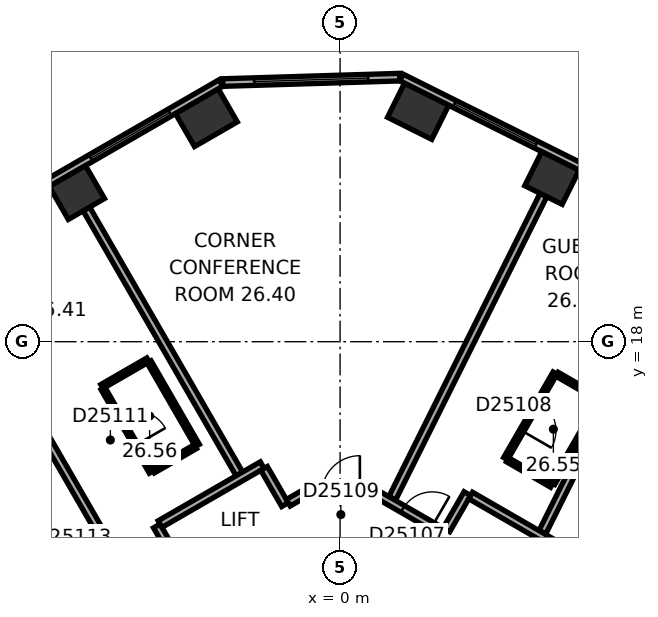
"""IFC4 building model, lengths in metres.
Left out: names, types, materials, properties, quantities, classifications, styles, units other than length and angle.
Written with IfcOpenShell. Run it as: python <this file> out.ifc"""

import sys

from ifc_helpers import new_model, si_unit, direction, frame, frame_2d, origin, origin_2d, place, context, subcontext, project, spatial, rectangle, extrude, element, fill, save


model = new_model("IFC4")
c1 = context("Model", 3, precision=1e-05, world=origin(), true_north=direction((0.0, 1.0)))
c2 = subcontext(c1, "Body", "Model", "MODEL_VIEW")
j1 = project(units=[si_unit("LENGTHUNIT", "METRE"), si_unit("PLANEANGLEUNIT", "RADIAN")], contexts=[c1])
p1 = place(None, origin())
s1 = spatial("IfcSite", under=j1, at=p1, CompositionType="ELEMENT")
p2 = place(p1, origin())
s2 = spatial("IfcBuilding", under=s1, at=p2, CompositionType="ELEMENT")
p3 = place(p2, frame((0.0, 0.0, 110.0)))
s3 = spatial("IfcBuildingStorey", under=s2, at=p3, CompositionType="ELEMENT", Elevation=110.0)
p4 = place(p3, frame((5.574, 22.306, 0.0), z_axis=(0.0, 0.0, 1.0), x_axis=(-0.894934361602, 0.44619781311, 0.0)))
e1 = element("IfcColumn", 1, at=p4, inside=s3, PredefinedType="COLUMN", context=c2, shape_type="SweptSolid", body=[
    extrude(rectangle(XDim=1.1, YDim=1.0, at=origin_2d()), origin(), (0.0, 0.0, 1.0), 3.3),
])
for number, where, z_axis, x_axis in (
    (2, (2.053, 24.062, 0.0), (0.0, 0.0, 1.0), (-0.895, 0.446, 0.0)),
    (3, (-3.518, 23.892, 0.0), (0.0, 0.0, 1.0), (-0.866, -0.5, 0.0)),
):
    element("IfcColumn", number, at=place(p3, frame(where, z_axis=z_axis, x_axis=x_axis)), inside=s3, PredefinedType="COLUMN", context=c2, shape_type="SweptSolid", body=[
        extrude(rectangle(XDim=1.3, YDim=1.0, at=origin_2d()), origin(), (0.0, 0.0, 1.0), 3.3),
    ])
p5 = place(p3, frame((-6.926, 21.925, 0.0), z_axis=(0.0, 0.0, 1.0), x_axis=(-0.866025403784, -0.5, 0.0)))
e4 = element("IfcColumn", 4, at=p5, inside=s3, PredefinedType="COLUMN", context=c2, shape_type="SweptSolid", body=[
    extrude(rectangle(XDim=1.1, YDim=1.0, at=origin_2d()), origin(), (0.0, 0.0, 1.0), 3.3),
])
p6 = place(p3, frame((20.63, 15.47, 0.0), z_axis=(0.0, 0.0, 1.0), x_axis=(-0.894934518609, 0.446197498203, 0.0)))
e5 = element("IfcWall", 5, at=p6, inside=s3, PredefinedType="STANDARD", context=c2, shape_type="SweptSolid", body=[
    extrude(rectangle(XDim=21.246, YDim=0.2, at=frame_2d((10.623, 0.0))), origin(), (0.0, 0.0, 1.0), 3.3),
])
p7 = place(p6, frame((1.553, 0.0, 0.8)))
e6 = element("IfcOpeningElement", 6, at=p7, cuts=e5, PredefinedType="OPENING", context=c2, shape_type="SweptSolid", body=[
    extrude(rectangle(XDim=2.4, YDim=1.7, at=frame_2d((1.2, 0.85))), frame((0.0, 0.11, 0.0), z_axis=(0.0, -1.0, 0.0), x_axis=(1.0, 0.0, 0.0)), (0.0, 0.0, 1.0), 0.22),
])
p8 = place(p6, frame((5.488, 0.0, 0.8)))
e7 = element("IfcOpeningElement", 7, at=p8, cuts=e5, PredefinedType="OPENING", context=c2, shape_type="SweptSolid", body=[
    extrude(rectangle(XDim=2.4, YDim=1.7, at=frame_2d((1.2, 0.85))), frame((0.0, 0.11, 0.0), z_axis=(0.0, -1.0, 0.0), x_axis=(1.0, 0.0, 0.0)), (0.0, 0.0, 1.0), 0.22),
])
p9 = place(p6, frame((9.422, 0.0, 0.8)))
e8 = element("IfcOpeningElement", 8, at=p9, cuts=e5, PredefinedType="OPENING", context=c2, shape_type="SweptSolid", body=[
    extrude(rectangle(XDim=2.4, YDim=1.7, at=frame_2d((1.2, 0.85))), frame((0.0, 0.11, 0.0), z_axis=(0.0, -1.0, 0.0), x_axis=(1.0, 0.0, 0.0)), (0.0, 0.0, 1.0), 0.22),
])
p10 = place(p6, frame((13.357, 0.0, 0.8)))
e9 = element("IfcOpeningElement", 9, at=p10, cuts=e5, PredefinedType="OPENING", context=c2, shape_type="SweptSolid", body=[
    extrude(rectangle(XDim=2.4, YDim=1.7, at=frame_2d((1.2, 0.85))), frame((0.0, 0.11, 0.0), z_axis=(0.0, -1.0, 0.0), x_axis=(1.0, 0.0, 0.0)), (0.0, 0.0, 1.0), 0.22),
])
p11 = place(p6, frame((17.292, 0.0, 0.8)))
e10 = element("IfcOpeningElement", 10, at=p11, cuts=e5, PredefinedType="OPENING", context=c2, shape_type="SweptSolid", body=[
    extrude(rectangle(XDim=2.4, YDim=1.7, at=frame_2d((1.2, 0.85))), frame((0.0, 0.11, 0.0), z_axis=(0.0, -1.0, 0.0), x_axis=(1.0, 0.0, 0.0)), (0.0, 0.0, 1.0), 0.22),
])
p12 = place(p3, frame((1.568, 24.961, 0.0), z_axis=(0.0, 0.0, 1.0), x_axis=(-0.999533359013, -0.030546099927, 0.0)))
e11 = element("IfcWall", 11, at=p12, inside=s3, PredefinedType="STANDARD", context=c2, shape_type="SweptSolid", body=[
    extrude(rectangle(XDim=4.66, YDim=0.2, at=frame_2d((2.33, 0.0))), origin(), (0.0, 0.0, 1.0), 3.3),
])
p13 = place(p12, frame((0.83, 0.0, 0.8)))
e12 = element("IfcOpeningElement", 12, at=p13, cuts=e11, PredefinedType="OPENING", context=c2, shape_type="SweptSolid", body=[
    extrude(rectangle(XDim=3.0, YDim=1.7, at=frame_2d((1.5, 0.85))), frame((0.0, 0.11, 0.0), z_axis=(0.0, -1.0, 0.0), x_axis=(1.0, 0.0, 0.0)), (0.0, 0.0, 1.0), 0.22),
])
p14 = place(p3, frame((-3.136, 24.805, 0.0), z_axis=(0.0, 0.0, 1.0), x_axis=(-0.866028291626, -0.499994998079, 0.0)))
e13 = element("IfcWall", 13, at=p14, inside=s3, PredefinedType="STANDARD", context=c2, shape_type="SweptSolid", body=[
    extrude(rectangle(XDim=21.246, YDim=0.2, at=frame_2d((10.623, 0.0))), origin(), (0.0, 0.0, 1.0), 3.3),
])
p15 = place(p14, frame((1.555, 0.0, 0.8)))
e14 = element("IfcOpeningElement", 14, at=p15, cuts=e13, PredefinedType="OPENING", context=c2, shape_type="SweptSolid", body=[
    extrude(rectangle(XDim=2.4, YDim=1.7, at=frame_2d((1.2, 0.85))), frame((0.0, 0.11, 0.0), z_axis=(0.0, -1.0, 0.0), x_axis=(1.0, 0.0, 0.0)), (0.0, 0.0, 1.0), 0.22),
])
p16 = place(p14, frame((5.489, 0.0, 0.8)))
e15 = element("IfcOpeningElement", 15, at=p16, cuts=e13, PredefinedType="OPENING", context=c2, shape_type="SweptSolid", body=[
    extrude(rectangle(XDim=2.4, YDim=1.7, at=frame_2d((1.2, 0.85))), frame((0.0, 0.11, 0.0), z_axis=(0.0, -1.0, 0.0), x_axis=(1.0, 0.0, 0.0)), (0.0, 0.0, 1.0), 0.22),
])
p17 = place(p14, frame((9.424, 0.0, 0.8)))
e16 = element("IfcOpeningElement", 16, at=p17, cuts=e13, PredefinedType="OPENING", context=c2, shape_type="SweptSolid", body=[
    extrude(rectangle(XDim=2.4, YDim=1.7, at=frame_2d((1.2, 0.85))), frame((0.0, 0.11, 0.0), z_axis=(0.0, -1.0, 0.0), x_axis=(1.0, 0.0, 0.0)), (0.0, 0.0, 1.0), 0.22),
])
p18 = place(p14, frame((13.358, 0.0, 0.8)))
e17 = element("IfcOpeningElement", 17, at=p18, cuts=e13, PredefinedType="OPENING", context=c2, shape_type="SweptSolid", body=[
    extrude(rectangle(XDim=2.4, YDim=1.7, at=frame_2d((1.2, 0.85))), frame((0.0, 0.11, 0.0), z_axis=(0.0, -1.0, 0.0), x_axis=(1.0, 0.0, 0.0)), (0.0, 0.0, 1.0), 0.22),
])
p19 = place(p14, frame((17.293, 0.0, 0.8)))
e18 = element("IfcOpeningElement", 18, at=p19, cuts=e13, PredefinedType="OPENING", context=c2, shape_type="SweptSolid", body=[
    extrude(rectangle(XDim=2.4, YDim=1.7, at=frame_2d((1.2, 0.85))), frame((0.0, 0.11, 0.0), z_axis=(0.0, -1.0, 0.0), x_axis=(1.0, 0.0, 0.0)), (0.0, 0.0, 1.0), 0.22),
])
p20 = place(p3, frame((-10.083, 19.524, 0.0), z_axis=(0.0, 0.0, 1.0), x_axis=(0.499999662836, -0.866025598446, 0.0)))
e19 = element("IfcWall", 19, at=p20, inside=s3, PredefinedType="PARTITIONING", context=c2, shape_type="SweptSolid", body=[
    extrude(rectangle(XDim=9.25, YDim=0.2, at=frame_2d((4.625, 0.0))), origin(), (0.0, 0.0, 1.0), 2.6),
])
p21 = place(p3, frame((-8.177, 13.223, 0.0), z_axis=(0.0, 0.0, 1.0), x_axis=(0.500087089641, -0.865975116718, 0.0)))
e20 = element("IfcWall", 20, at=p21, inside=s3, PredefinedType="PARTITIONING", context=c2, shape_type="SweptSolid", body=[
    extrude(rectangle(XDim=2.84, YDim=0.12, at=frame_2d((1.42, 0.0))), origin(), (0.0, 0.0, 1.0), 3.05),
])
p22 = place(p21, frame((0.97, 0.0, 0.0)))
e21 = element("IfcOpeningElement", 21, at=p22, cuts=e20, PredefinedType="OPENING", context=c2, shape_type="SweptSolid", body=[
    extrude(rectangle(XDim=0.9, YDim=2.1, at=frame_2d((0.45, 1.05))), frame((0.0, 0.07, 0.0), z_axis=(0.0, -1.0, 0.0), x_axis=(1.0, 0.0, 0.0)), (0.0, 0.0, 1.0), 0.14),
])
p23 = place(p3, frame((-6.676, 21.492, 0.0), z_axis=(0.0, 0.0, 1.0), x_axis=(0.500011263043, -0.866018900966, 0.0)))
e22 = element("IfcWall", 22, at=p23, inside=s3, PredefinedType="PARTITIONING", context=c2, shape_type="SweptSolid", body=[
    extrude(rectangle(XDim=8.049, YDim=0.2, at=frame_2d((4.024, 0.0))), origin(), (0.0, 0.0, 1.0), 3.05),
])
p24 = place(p3, frame((-6.268, 16.82, 0.0), z_axis=(0.0, 0.0, 1.0), x_axis=(0.866002662425, 0.500039387122, 0.0)))
e23 = element("IfcWall", 23, at=p24, inside=s3, PredefinedType="PARTITIONING", context=c2, shape_type="SweptSolid", body=[
    extrude(rectangle(XDim=1.4, YDim=0.12, at=frame_2d((0.7, 0.0))), origin(), (0.0, 0.0, 1.0), 3.05),
])
p25 = place(p3, frame((-5.026, 17.469, 0.0), z_axis=(0.0, 0.0, 1.0), x_axis=(0.500005339912, -0.866022320763, 0.0)))
e24 = element("IfcWall", 24, at=p25, inside=s3, PredefinedType="PARTITIONING", context=c2, shape_type="SweptSolid", body=[
    extrude(rectangle(XDim=2.54, YDim=0.12, at=frame_2d((1.27, 0.0))), origin(), (0.0, 0.0, 1.0), 3.05),
])
p26 = place(p3, frame((-4.968, 14.569, 0.0), z_axis=(0.0, 0.0, 1.0), x_axis=(-0.500046963369, 0.865998287773, 0.0)))
e25 = element("IfcWall", 25, at=p26, inside=s3, PredefinedType="PARTITIONING", context=c2, shape_type="SweptSolid", body=[
    extrude(rectangle(XDim=2.54, YDim=0.12, at=frame_2d((1.27, 0.0))), origin(), (0.0, 0.0, 1.0), 3.05),
])
p27 = place(p26, frame((0.82, 0.0, 0.0)))
e26 = element("IfcOpeningElement", 26, at=p27, cuts=e25, PredefinedType="OPENING", context=c2, shape_type="SweptSolid", body=[
    extrude(rectangle(XDim=0.9, YDim=2.1, at=frame_2d((0.45, 1.05))), frame((0.0, 0.07, 0.0), z_axis=(0.0, -1.0, 0.0), x_axis=(1.0, 0.0, 0.0)), (0.0, 0.0, 1.0), 0.14),
])
p28 = place(p3, frame((-4.823, 13.152, 0.0), z_axis=(0.0, 0.0, 1.0), x_axis=(0.499986357472, -0.866033280158, 0.0)))
e27 = element("IfcWall", 27, at=p28, inside=s3, PredefinedType="PARTITIONING", context=c2, shape_type="SweptSolid", body=[
    extrude(rectangle(XDim=1.201, YDim=0.2, at=frame_2d((0.601, 0.0))), origin(), (0.0, 0.0, 1.0), 3.05),
])
p29 = place(p3, frame((-3.808, 15.239, 0.0), z_axis=(0.0, 0.0, 1.0), x_axis=(-0.866087136806, -0.499893060024, 0.0)))
e28 = element("IfcWall", 28, at=p29, inside=s3, PredefinedType="PARTITIONING", context=c2, shape_type="SweptSolid", body=[
    extrude(rectangle(XDim=1.28, YDim=0.12, at=frame_2d((0.64, 0.0))), origin(), (0.0, 0.0, 1.0), 3.05),
])
p30 = place(p3, frame((-2.05, 14.752, 0.0), z_axis=(0.0, 0.0, 1.0), x_axis=(-0.866030936828, -0.499990416364, 0.0)))
e29 = element("IfcWall", 29, at=p30, inside=s3, PredefinedType="PARTITIONING", context=c2, shape_type="SweptSolid", body=[
    extrude(rectangle(XDim=3.102, YDim=0.2, at=frame_2d((1.551, 0.0))), origin(), (0.0, 0.0, 1.0), 3.05),
])
p31 = place(p3, frame((-1.449, 13.712, 0.0), z_axis=(0.0, 0.0, 1.0), x_axis=(-0.499978356969, 0.866037899034, 0.0)))
e30 = element("IfcWall", 30, at=p31, inside=s3, PredefinedType="PARTITIONING", context=c2, shape_type="SweptSolid", body=[
    extrude(rectangle(XDim=1.101, YDim=0.2, at=frame_2d((0.551, 0.0))), origin(), (0.0, 0.0, 1.0), 3.05),
])
p32 = place(p3, frame((-0.95, 14.001, 0.0), z_axis=(0.0, 0.0, 1.0), x_axis=(-0.86609177584, -0.499885022602, 0.0)))
e31 = element("IfcWall", 31, at=p32, inside=s3, PredefinedType="PARTITIONING", context=c2, shape_type="SweptSolid", body=[
    extrude(rectangle(XDim=0.477, YDim=0.2, at=frame_2d((0.238, 0.0))), origin(), (0.0, 0.0, 1.0), 3.05),
])
p33 = place(p3, frame((0.95, 14.001, 0.0), z_axis=(0.0, 0.0, 1.0), x_axis=(-1.0, 0.0, 0.0)))
e32 = element("IfcWall", 32, at=p33, inside=s3, PredefinedType="PARTITIONING", context=c2, shape_type="SweptSolid", body=[
    extrude(rectangle(XDim=1.86, YDim=0.2, at=frame_2d((0.93, 0.0))), origin(), (0.0, 0.0, 1.0), 3.05),
])
p34 = place(p33, frame((0.43, 0.0, 0.0)))
e33 = element("IfcOpeningElement", 33, at=p34, cuts=e32, PredefinedType="OPENING", context=c2, shape_type="SweptSolid", body=[
    extrude(rectangle(XDim=1.0, YDim=2.1, at=frame_2d((0.5, 1.05))), frame((0.0, 0.11, 0.0), z_axis=(0.0, -1.0, 0.0), x_axis=(1.0, 0.0, 0.0)), (0.0, 0.0, 1.0), 0.22),
])
p35 = place(p3, frame((2.748, 12.962, 0.0), z_axis=(0.0, 0.0, 1.0), x_axis=(-0.866013897511, 0.50001992892, 0.0)))
e34 = element("IfcWall", 34, at=p35, inside=s3, PredefinedType="PARTITIONING", context=c2, shape_type="SweptSolid", body=[
    extrude(rectangle(XDim=2.037, YDim=0.2, at=frame_2d((1.018, 0.0))), origin(), (0.0, 0.0, 1.0), 3.05),
])
p36 = place(p35, frame((0.372, 0.0, 0.0)))
e35 = element("IfcOpeningElement", 35, at=p36, cuts=e34, PredefinedType="OPENING", context=c2, shape_type="SweptSolid", body=[
    extrude(rectangle(XDim=0.9, YDim=2.1, at=frame_2d((0.45, 1.05))), frame((0.0, 0.11, 0.0), z_axis=(0.0, -1.0, 0.0), x_axis=(1.0, 0.0, 0.0)), (0.0, 0.0, 1.0), 0.22),
])
p37 = place(p3, frame((3.349, 14.002, 0.0), z_axis=(0.0, 0.0, 1.0), x_axis=(-0.500074377092, -0.865982457891, 0.0)))
e36 = element("IfcWall", 36, at=p37, inside=s3, PredefinedType="PARTITIONING", context=c2, shape_type="SweptSolid", body=[
    extrude(rectangle(XDim=1.101, YDim=0.2, at=frame_2d((0.55, 0.0))), origin(), (0.0, 0.0, 1.0), 3.05),
])
p38 = place(p3, frame((4.356, 14.922, 0.0), z_axis=(0.0, 0.0, 1.0), x_axis=(0.499936506574, 0.866062058628, 0.0)))
e37 = element("IfcWall", 37, at=p38, inside=s3, PredefinedType="PARTITIONING", context=c2, shape_type="SweptSolid", body=[
    extrude(rectangle(XDim=2.6, YDim=0.12, at=frame_2d((1.3, 0.0))), origin(), (0.0, 0.0, 1.0), 3.05),
])
p39 = place(p38, frame((0.85, 0.0, 0.0)))
e38 = element("IfcOpeningElement", 38, at=p39, cuts=e37, PredefinedType="OPENING", context=c2, shape_type="SweptSolid", body=[
    extrude(rectangle(XDim=0.9, YDim=2.1, at=frame_2d((0.45, 1.05))), frame((0.0, 0.07, 0.0), z_axis=(0.0, -1.0, 0.0), x_axis=(1.0, 0.0, 0.0)), (0.0, 0.0, 1.0), 0.14),
])
p40 = place(p3, frame((5.351, 21.859, 0.0), z_axis=(0.0, 0.0, 1.0), x_axis=(-0.446205309328, -0.894930624086, 0.0)))
e39 = element("IfcWall", 39, at=p40, inside=s3, PredefinedType="PARTITIONING", context=c2, shape_type="SweptSolid", body=[
    extrude(rectangle(XDim=8.913, YDim=0.2, at=frame_2d((4.457, 0.0))), origin(), (0.0, 0.0, 1.0), 2.6),
])
p41 = place(p3, frame((5.569, 14.222, 0.0), z_axis=(0.0, 0.0, 1.0), x_axis=(-0.866036909293, 0.499980071345, 0.0)))
e40 = element("IfcWall", 40, at=p41, inside=s3, PredefinedType="PARTITIONING", context=c2, shape_type="SweptSolid", body=[
    extrude(rectangle(XDim=1.34, YDim=0.12, at=frame_2d((0.67, 0.0))), origin(), (0.0, 0.0, 1.0), 3.05),
])
p42 = place(p3, frame((5.708, 17.144, 0.0), z_axis=(0.0, 0.0, 1.0), x_axis=(0.866082447003, -0.499901185229, 0.0)))
e41 = element("IfcWall", 41, at=p42, inside=s3, PredefinedType="PARTITIONING", context=c2, shape_type="SweptSolid", body=[
    extrude(rectangle(XDim=1.34, YDim=0.12, at=frame_2d((0.67, 0.0))), origin(), (0.0, 0.0, 1.0), 3.05),
])
p43 = place(p3, frame((6.839, 16.422, 0.0), z_axis=(0.0, 0.0, 1.0), x_axis=(-0.50000366821, -0.866023285932, 0.0)))
e42 = element("IfcWall", 42, at=p43, inside=s3, PredefinedType="PARTITIONING", context=c2, shape_type="SweptSolid", body=[
    extrude(rectangle(XDim=2.48, YDim=0.12, at=frame_2d((1.24, 0.0))), origin(), (0.0, 0.0, 1.0), 3.05),
])
p44 = place(p3, frame((8.872, 20.104, 0.0), z_axis=(0.0, 0.0, 1.0), x_axis=(-0.446218378653, -0.894924107706, 0.0)))
e43 = element("IfcWall", 43, at=p44, inside=s3, PredefinedType="PARTITIONING", context=c2, shape_type="SweptSolid", body=[
    extrude(rectangle(XDim=7.95, YDim=0.2, at=frame_2d((3.975, 0.0))), origin(), (0.0, 0.0, 1.0), 3.05),
])
p45 = place(p3, frame((10.885, 9.652, 0.0), z_axis=(0.0, 0.0, 1.0), x_axis=(-0.866033868542, 0.499985338323, 0.0)))
e44 = element("IfcWall", 44, at=p45, inside=s3, PredefinedType="PARTITIONING", context=c2, shape_type="SweptSolid", body=[
    extrude(rectangle(XDim=8.602, YDim=0.2, at=frame_2d((4.301, 0.0))), origin(), (0.0, 0.0, 1.0), 3.05),
])
p46 = place(p45, frame((2.739, 0.0, 0.0)))
e45 = element("IfcOpeningElement", 45, at=p46, cuts=e44, PredefinedType="OPENING", context=c2, shape_type="SweptSolid", body=[
    extrude(rectangle(XDim=1.0, YDim=2.1, at=frame_2d((0.5, 1.05))), frame((0.0, 0.11, 0.0), z_axis=(0.0, -1.0, 0.0), x_axis=(1.0, 0.0, 0.0)), (0.0, 0.0, 1.0), 0.22),
])
p47 = place(p11, origin())
e46 = element("IfcWindow", 46, at=p47, inside=s3, PartitioningType="SINGLE_PANEL", PredefinedType="WINDOW", context=c2, shape_type="SweptSolid", body=[
    extrude(rectangle(XDim=2.4, YDim=1.7, at=frame_2d((1.2, 0.85))), frame((0.0, 0.03, 0.0), z_axis=(0.0, -1.0, 0.0), x_axis=(1.0, 0.0, 0.0)), (0.0, 0.0, 1.0), 0.06),
])
fill(e10, e46)
p48 = place(p13, origin())
e47 = element("IfcWindow", 47, at=p48, inside=s3, PartitioningType="SINGLE_PANEL", PredefinedType="WINDOW", context=c2, shape_type="SweptSolid", body=[
    extrude(rectangle(XDim=3.0, YDim=1.7, at=frame_2d((1.5, 0.85))), frame((0.0, 0.03, 0.0), z_axis=(0.0, -1.0, 0.0), x_axis=(1.0, 0.0, 0.0)), (0.0, 0.0, 1.0), 0.06),
])
fill(e12, e47)
p49 = place(p15, origin())
e48 = element("IfcWindow", 48, at=p49, inside=s3, PartitioningType="SINGLE_PANEL", PredefinedType="WINDOW", context=c2, shape_type="SweptSolid", body=[
    extrude(rectangle(XDim=2.4, YDim=1.7, at=frame_2d((1.2, 0.85))), frame((0.0, 0.03, 0.0), z_axis=(0.0, -1.0, 0.0), x_axis=(1.0, 0.0, 0.0)), (0.0, 0.0, 1.0), 0.06),
])
fill(e14, e48)
p50 = place(p36, origin())
e49 = element("IfcDoor", 49, at=p50, inside=s3, OperationType="SINGLE_SWING_LEFT", PredefinedType="DOOR", context=c2, shape_type="SweptSolid", body=[
    extrude(rectangle(XDim=0.9, YDim=2.1, at=frame_2d((0.45, 1.05))), frame((0.0, 0.025, 0.0), z_axis=(0.0, -1.0, 0.0), x_axis=(1.0, 0.0, 0.0)), (0.0, 0.0, 1.0), 0.05),
])
fill(e35, e49)
p51 = place(p39, origin())
e50 = element("IfcDoor", 50, at=p51, inside=s3, OperationType="SINGLE_SWING_LEFT", PredefinedType="DOOR", context=c2, shape_type="SweptSolid", body=[
    extrude(rectangle(XDim=0.9, YDim=2.1, at=frame_2d((0.45, 1.05))), frame((0.0, 0.025, 0.0), z_axis=(0.0, -1.0, 0.0), x_axis=(1.0, 0.0, 0.0)), (0.0, 0.0, 1.0), 0.05),
])
fill(e38, e50)
p52 = place(p34, origin())
e51 = element("IfcDoor", 51, at=p52, inside=s3, OperationType="SINGLE_SWING_LEFT", PredefinedType="DOOR", context=c2, shape_type="SweptSolid", body=[
    extrude(rectangle(XDim=1.0, YDim=2.1, at=frame_2d((0.5, 1.05))), frame((0.0, 0.025, 0.0), z_axis=(0.0, -1.0, 0.0), x_axis=(1.0, 0.0, 0.0)), (0.0, 0.0, 1.0), 0.05),
])
fill(e33, e51)
p53 = place(p27, origin())
e52 = element("IfcDoor", 52, at=p53, inside=s3, OperationType="SINGLE_SWING_LEFT", PredefinedType="DOOR", context=c2, shape_type="SweptSolid", body=[
    extrude(rectangle(XDim=0.9, YDim=2.1, at=frame_2d((0.45, 1.05))), frame((0.0, 0.025, 0.0), z_axis=(0.0, -1.0, 0.0), x_axis=(1.0, 0.0, 0.0)), (0.0, 0.0, 1.0), 0.05),
])
fill(e26, e52)
save(model, sys.argv[1])
